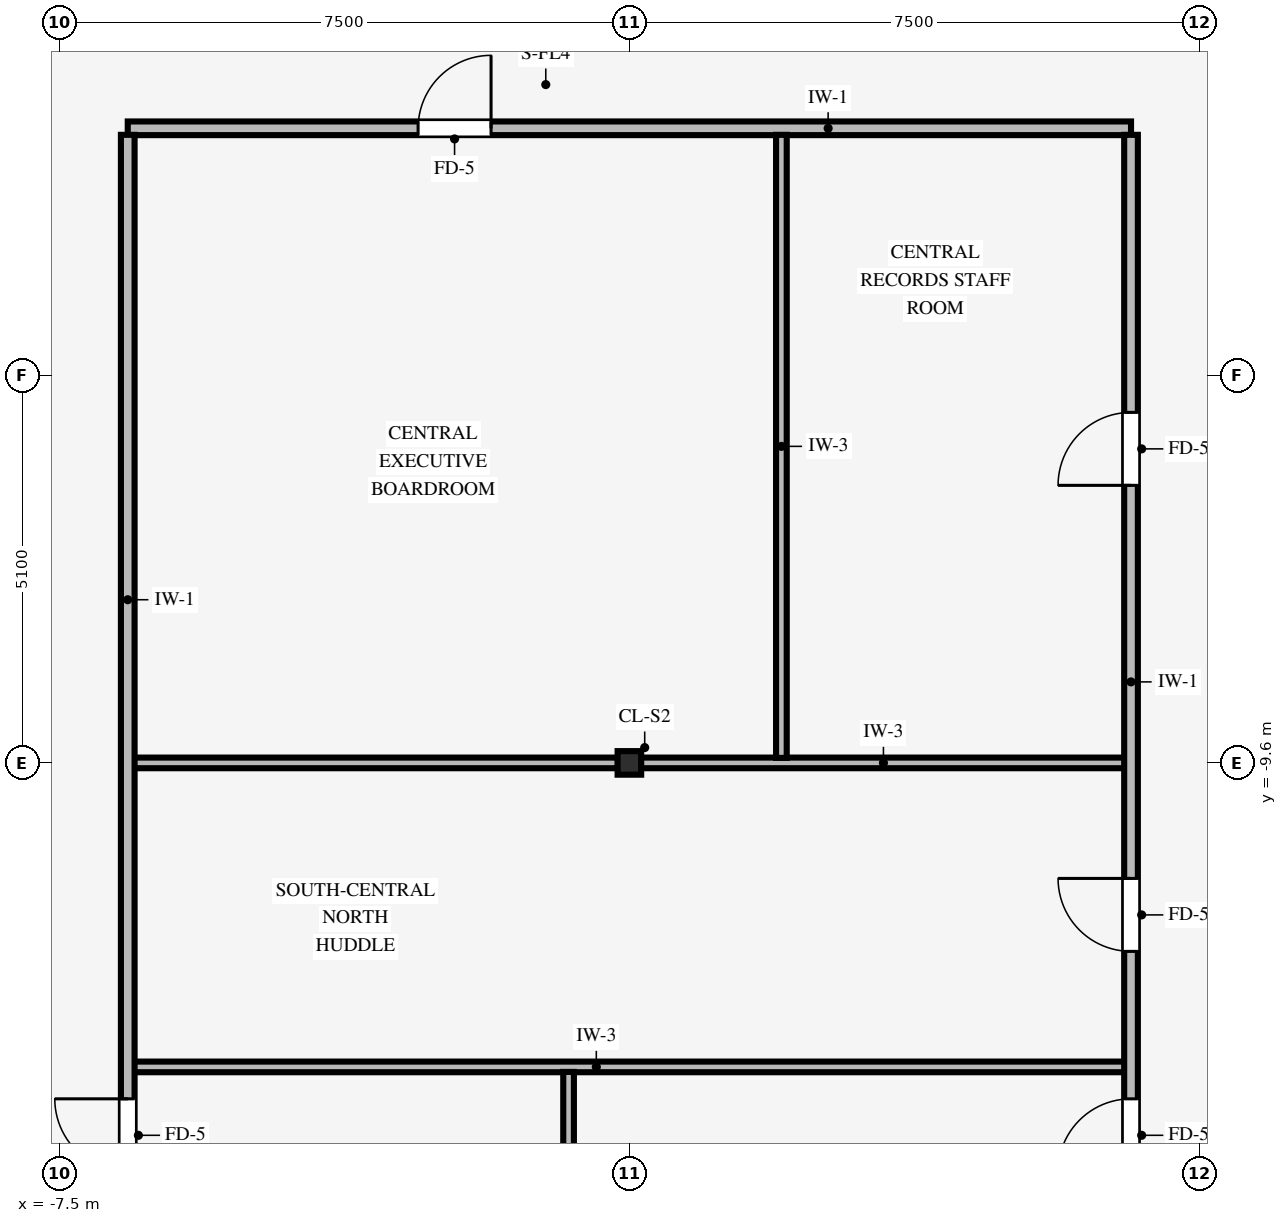
"""IFC4 building model, lengths in metres.
Left out: names, types, materials, properties, quantities, classifications, styles, units other than length and angle.
Written with IfcOpenShell. Run it as: python <this file> out.ifc"""

import sys

from ifc_helpers import new_model, si_unit, direction, frame, frame_2d, origin, origin_2d, place, context, subcontext, project, spatial, rectangle, i_section, extrude, source, transform, mapped, element, fill, save


model = new_model("IFC4")
c1 = context("Model", 3, precision=1e-05, world=origin(), true_north=direction((0.0, 1.0)))
c2 = subcontext(c1, "Body", "Model", "MODEL_VIEW")
j1 = project(units=[si_unit("LENGTHUNIT", "METRE"), si_unit("PLANEANGLEUNIT", "RADIAN")], contexts=[c1])
p1 = place(None, origin())
s1 = spatial("IfcSite", under=j1, at=p1, CompositionType="ELEMENT")
p2 = place(p1, origin())
s2 = spatial("IfcBuilding", under=s1, at=p2, CompositionType="ELEMENT")
p3 = place(p2, frame((0.0, 0.0, 279.85)))
s3 = spatial("IfcBuildingStorey", under=s2, at=p3, CompositionType="ELEMENT", Elevation=279.85)
p4 = place(p3, frame((0.0, -9.6, 0.0), z_axis=(0.0, 0.0, 1.0), x_axis=(1.0, 0.0, 0.0)))
e1 = element("IfcColumn", 1, at=p4, inside=s3, PredefinedType="COLUMN", context=c2, shape_type="SweptSolid", body=[
    extrude(i_section(OverallWidth=0.31, OverallDepth=0.31, WebThickness=0.015, FlangeThickness=0.015, FilletRadius=0.015, at=origin_2d()), origin(), (0.0, 0.0, 1.0), 3.37),
])
p5 = place(p3, frame((-6.524, -13.6, 0.0), z_axis=(0.0, 0.0, 1.0), x_axis=(1.0, 0.0, 0.0)))
e2 = element("IfcWall", 2, at=p5, inside=s3, PredefinedType="PARTITIONING", context=c2, shape_type="SweptSolid", body=[
    extrude(rectangle(XDim=13.058, YDim=0.14, at=frame_2d((6.529, 0.0))), origin(), (0.0, 0.0, 1.0), 3.038),
])
p6 = place(p3, frame((-6.524, -9.6, 0.0), z_axis=(0.0, 0.0, 1.0), x_axis=(1.0, 0.0, 0.0)))
e3 = element("IfcWall", 3, at=p6, inside=s3, PredefinedType="PARTITIONING", context=c2, shape_type="SweptSolid", body=[
    extrude(rectangle(XDim=6.373, YDim=0.14, at=frame_2d((3.187, 0.0))), origin(), (0.0, 0.0, 1.0), 2.405),
])
p7 = place(p3, frame((0.151, -9.6, 0.0), z_axis=(0.0, 0.0, 1.0), x_axis=(1.0, 0.0, 0.0)))
e4 = element("IfcWall", 4, at=p7, inside=s3, PredefinedType="PARTITIONING", context=c2, shape_type="SweptSolid", body=[
    extrude(rectangle(XDim=6.383, YDim=0.14, at=frame_2d((3.191, 0.0))), origin(), (0.0, 0.0, 1.0), 2.405),
])
p8 = place(p3, frame((-6.6, -1.25, 0.0), z_axis=(0.0, 0.0, 1.0), x_axis=(1.0, 0.0, 0.0)))
e5 = element("IfcWall", 5, at=p8, inside=s3, PredefinedType="PARTITIONING", context=c2, shape_type="SweptSolid", body=[
    extrude(rectangle(XDim=13.2, YDim=0.18, at=frame_2d((6.6, 0.0))), origin(), (0.0, 0.0, 1.0), 3.36),
])
p9 = place(p8, frame((3.82, 0.0, 0.0)))
e6 = element("IfcOpeningElement", 6, at=p9, cuts=e5, PredefinedType="OPENING", context=c2, shape_type="SweptSolid", body=[
    extrude(rectangle(XDim=0.96, YDim=2.1, at=frame_2d((0.48, 1.05))), frame((0.0, 0.1, 0.0), z_axis=(0.0, -1.0, 0.0), x_axis=(1.0, 0.0, 0.0)), (0.0, 0.0, 1.0), 0.2),
])
p10 = place(p3, frame((-6.6, -19.1, 0.0), z_axis=(0.0, 0.0, 1.0), x_axis=(0.0, 1.0, 0.0)))
e7 = element("IfcWall", 7, at=p10, inside=s3, PredefinedType="PARTITIONING", context=c2, shape_type="SweptSolid", body=[
    extrude(rectangle(XDim=17.764, YDim=0.18, at=frame_2d((8.882, 0.0))), origin(), (0.0, 0.0, 1.0), 3.36),
])
p11 = place(p10, frame((4.12, 0.0, 0.0)))
e8 = element("IfcOpeningElement", 8, at=p11, cuts=e7, PredefinedType="OPENING", context=c2, shape_type="SweptSolid", body=[
    extrude(rectangle(XDim=0.96, YDim=2.1, at=frame_2d((0.48, 1.05))), frame((0.0, 0.1, 0.0), z_axis=(0.0, -1.0, 0.0), x_axis=(1.0, 0.0, 0.0)), (0.0, 0.0, 1.0), 0.2),
])
p12 = place(p3, frame((-0.8, -19.1, 0.0), z_axis=(0.0, 0.0, 1.0), x_axis=(0.0, 1.0, 0.0)))
e9 = element("IfcWall", 9, at=p12, inside=s3, PredefinedType="PARTITIONING", context=c2, shape_type="SweptSolid", body=[
    extrude(rectangle(XDim=5.434, YDim=0.14, at=frame_2d((2.717, 0.0))), origin(), (0.0, 0.0, 1.0), 3.36),
])
p13 = place(p3, frame((2.0, -9.534, 0.0), z_axis=(0.0, 0.0, 1.0), x_axis=(0.0, 1.0, 0.0)))
e10 = element("IfcWall", 10, at=p13, inside=s3, PredefinedType="PARTITIONING", context=c2, shape_type="SweptSolid", body=[
    extrude(rectangle(XDim=8.198, YDim=0.14, at=frame_2d((4.099, 0.0))), origin(), (0.0, 0.0, 1.0), 3.36),
])
p14 = place(p3, frame((6.6, -19.1, 0.0), z_axis=(0.0, 0.0, 1.0), x_axis=(0.0, 1.0, 0.0)))
e11 = element("IfcWall", 11, at=p14, inside=s3, PredefinedType="PARTITIONING", context=c2, shape_type="SweptSolid", body=[
    extrude(rectangle(XDim=17.764, YDim=0.18, at=frame_2d((8.882, 0.0))), origin(), (0.0, 0.0, 1.0), 3.36),
])
p15 = place(p14, frame((13.152, 0.0, 0.0)))
e12 = element("IfcOpeningElement", 12, at=p15, cuts=e11, PredefinedType="OPENING", context=c2, shape_type="SweptSolid", body=[
    extrude(rectangle(XDim=0.96, YDim=2.1, at=frame_2d((0.48, 1.05))), frame((0.0, 0.1, 0.0), z_axis=(0.0, -1.0, 0.0), x_axis=(1.0, 0.0, 0.0)), (0.0, 0.0, 1.0), 0.2),
])
p16 = place(p14, frame((7.02, 0.0, 0.0)))
e13 = element("IfcOpeningElement", 13, at=p16, cuts=e11, PredefinedType="OPENING", context=c2, shape_type="SweptSolid", body=[
    extrude(rectangle(XDim=0.96, YDim=2.1, at=frame_2d((0.48, 1.05))), frame((0.0, 0.1, 0.0), z_axis=(0.0, -1.0, 0.0), x_axis=(1.0, 0.0, 0.0)), (0.0, 0.0, 1.0), 0.2),
])
p17 = place(p14, frame((4.12, 0.0, 0.0)))
e14 = element("IfcOpeningElement", 14, at=p17, cuts=e11, PredefinedType="OPENING", context=c2, shape_type="SweptSolid", body=[
    extrude(rectangle(XDim=0.96, YDim=2.1, at=frame_2d((0.48, 1.05))), frame((0.0, 0.1, 0.0), z_axis=(0.0, -1.0, 0.0), x_axis=(1.0, 0.0, 0.0)), (0.0, 0.0, 1.0), 0.2),
])
m1 = source(origin(), c2, "Body", "SweptSolid", [
    extrude(rectangle(XDim=0.96, YDim=2.1, at=frame_2d((0.48, 1.05))), frame((0.0, 0.025, 0.0), z_axis=(0.0, -1.0, 0.0), x_axis=(1.0, 0.0, 0.0)), (0.0, 0.0, 1.0), 0.05),
])
p18 = place(p9, origin())
e15 = element("IfcDoor", 15, at=p18, inside=s3, OperationType="SINGLE_SWING_RIGHT", PredefinedType="DOOR", context=c2, shape_type="MappedRepresentation", body=[
    mapped(m1, transform((0.0, 0.0, 0.0), scale=1.0)),
])
fill(e6, e15)
p19 = place(p15, origin())
e16 = element("IfcDoor", 16, at=p19, inside=s3, OperationType="SINGLE_SWING_LEFT", PredefinedType="DOOR", context=c2, shape_type="MappedRepresentation", body=[
    mapped(m1, transform((0.0, 0.0, 0.0), scale=1.0)),
])
fill(e12, e16)
p20 = place(p16, origin())
e17 = element("IfcDoor", 17, at=p20, inside=s3, OperationType="SINGLE_SWING_RIGHT", PredefinedType="DOOR", context=c2, shape_type="MappedRepresentation", body=[
    mapped(m1, transform((0.0, 0.0, 0.0), scale=1.0)),
])
fill(e13, e17)
p21 = place(p11, origin())
e18 = element("IfcDoor", 18, at=p21, inside=s3, OperationType="SINGLE_SWING_RIGHT", PredefinedType="DOOR", context=c2, shape_type="MappedRepresentation", body=[
    mapped(m1, transform((0.0, 0.0, 0.0), scale=1.0)),
])
fill(e8, e18)
p22 = place(p17, origin())
e19 = element("IfcDoor", 19, at=p22, inside=s3, OperationType="SINGLE_SWING_LEFT", PredefinedType="DOOR", context=c2, shape_type="MappedRepresentation", body=[
    mapped(m1, transform((0.0, 0.0, 0.0), scale=1.0)),
])
fill(e14, e19)
save(model, sys.argv[1])
